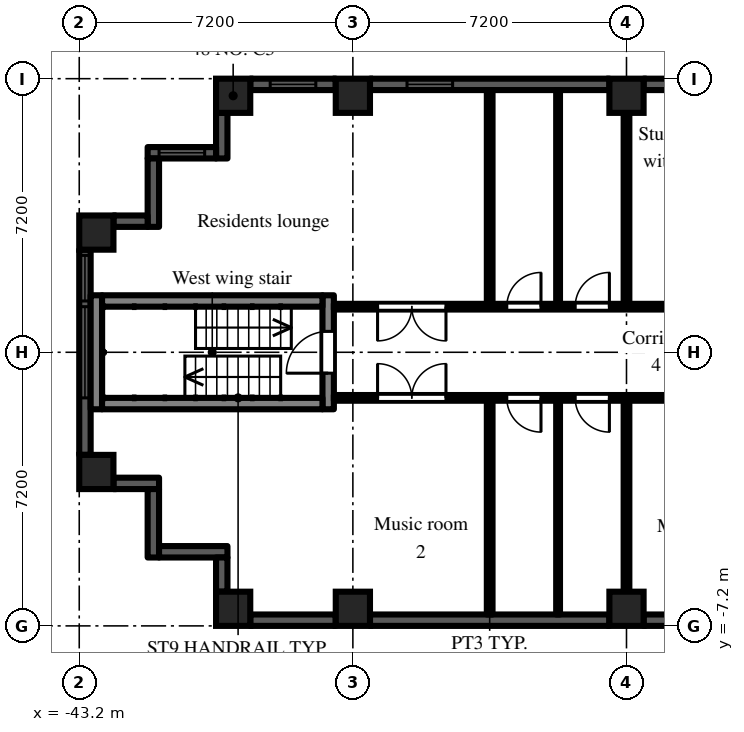
"""IFC4 building model, lengths in metres.
Left out: names, types, materials, properties, quantities, classifications, styles, units other than length and angle.
Written with IfcOpenShell. Run it as: python <this file> out.ifc"""

import sys

from ifc_helpers import new_model, si_unit, direction, frame, frame_2d, origin, origin_2d, place, context, subcontext, project, spatial, rectangle, extrude, element, fill, save


model = new_model("IFC4")
c1 = context("Model", 3, precision=1e-05, world=origin(), true_north=direction((0.0, 1.0)))
c2 = subcontext(c1, "Body", "Model", "MODEL_VIEW")
j1 = project(units=[si_unit("LENGTHUNIT", "METRE"), si_unit("PLANEANGLEUNIT", "RADIAN")], contexts=[c1])
p1 = place(None, origin())
s1 = spatial("IfcSite", under=j1, at=p1, CompositionType="ELEMENT")
p2 = place(p1, origin())
s2 = spatial("IfcBuilding", under=s1, at=p2, CompositionType="ELEMENT")
p3 = place(p2, frame((0.0, 0.0, 108.9)))
s3 = spatial("IfcBuildingStorey", under=s2, at=p3, CompositionType="ELEMENT", Elevation=108.9)
for number, where, z_axis, x_axis in (
    (1, (-42.75, -3.15, 0.0), (0.0, 0.0, 1.0), (1.0, 0.0, 0.0)),
    (2, (-42.75, 3.15, 0.0), (0.0, 0.0, 1.0), (1.0, 0.0, 0.0)),
    (3, (-39.15, -6.75, 0.0), (0.0, 0.0, 1.0), (1.0, 0.0, 0.0)),
    (4, (-39.15, 6.75, 0.0), (0.0, 0.0, 1.0), (1.0, 0.0, 0.0)),
    (5, (-36.0, -6.75, 0.0), (0.0, 0.0, 1.0), (1.0, 0.0, 0.0)),
    (6, (-36.0, 6.75, 0.0), (0.0, 0.0, 1.0), (1.0, 0.0, 0.0)),
    (7, (-28.8, -6.75, 0.0), (0.0, 0.0, 1.0), (1.0, 0.0, 0.0)),
    (8, (-28.8, 6.75, 0.0), (0.0, 0.0, 1.0), (1.0, 0.0, 0.0)),
):
    element("IfcColumn", number, at=place(p3, frame(where, z_axis=z_axis, x_axis=x_axis)), inside=s3, PredefinedType="COLUMN", context=c2, shape_type="SweptSolid", body=[
        extrude(rectangle(XDim=0.9, YDim=0.9, at=origin_2d()), origin(), (0.0, 0.0, 1.0), 3.0),
    ])
p4 = place(p3, frame((-25.2, 7.05, 0.0), z_axis=(0.0, 0.0, 1.0), x_axis=(-1.0, 0.0, 0.0)))
e9 = element("IfcWall", 9, at=p4, inside=s3, PredefinedType="SOLIDWALL", context=c2, shape_type="SweptSolid", body=[
    extrude(rectangle(XDim=3.15, YDim=0.3, at=frame_2d((1.575, 0.0))), origin(), (0.0, 0.0, 1.0), 2.2),
])
p5 = place(p4, frame((0.975, 0.0, 0.2)))
e10 = element("IfcOpeningElement", 10, at=p5, cuts=e9, PredefinedType="OPENING", context=c2, shape_type="SweptSolid", body=[
    extrude(rectangle(XDim=1.2, YDim=1.85, at=frame_2d((0.6, 0.925))), frame((0.0, 0.16, 0.0), z_axis=(0.0, -1.0, 0.0), x_axis=(1.0, 0.0, 0.0)), (0.0, 0.0, 1.0), 0.32),
])
p6 = place(p3, frame((-29.25, 7.05, 0.0), z_axis=(0.0, 0.0, 1.0), x_axis=(-1.0, 0.0, 0.0)))
e11 = element("IfcWall", 11, at=p6, inside=s3, PredefinedType="SOLIDWALL", context=c2, shape_type="SweptSolid", body=[
    extrude(rectangle(XDim=6.3, YDim=0.3, at=frame_2d((3.15, 0.0))), origin(), (0.0, 0.0, 1.0), 2.2),
])
p7 = place(p6, frame((4.125, 0.0, 0.2)))
e12 = element("IfcOpeningElement", 12, at=p7, cuts=e11, PredefinedType="OPENING", context=c2, shape_type="SweptSolid", body=[
    extrude(rectangle(XDim=1.2, YDim=1.85, at=frame_2d((0.6, 0.925))), frame((0.0, 0.16, 0.0), z_axis=(0.0, -1.0, 0.0), x_axis=(1.0, 0.0, 0.0)), (0.0, 0.0, 1.0), 0.32),
])
p8 = place(p3, frame((-36.45, 7.05, 0.0), z_axis=(0.0, 0.0, 1.0), x_axis=(-1.0, 0.0, 0.0)))
e13 = element("IfcWall", 13, at=p8, inside=s3, PredefinedType="SOLIDWALL", context=c2, shape_type="SweptSolid", body=[
    extrude(rectangle(XDim=2.25, YDim=0.3, at=frame_2d((1.125, 0.0))), origin(), (0.0, 0.0, 1.0), 2.2),
])
p9 = place(p8, frame((0.525, 0.0, 0.2)))
e14 = element("IfcOpeningElement", 14, at=p9, cuts=e13, PredefinedType="OPENING", context=c2, shape_type="SweptSolid", body=[
    extrude(rectangle(XDim=1.2, YDim=1.85, at=frame_2d((0.6, 0.925))), frame((0.0, 0.16, 0.0), z_axis=(0.0, -1.0, 0.0), x_axis=(1.0, 0.0, 0.0)), (0.0, 0.0, 1.0), 0.32),
])
p10 = place(p3, frame((-39.45, 6.3, 0.0), z_axis=(0.0, 0.0, 1.0), x_axis=(0.0, -1.0, 0.0)))
e15 = element("IfcWall", 15, at=p10, inside=s3, PredefinedType="SOLIDWALL", context=c2, shape_type="SweptSolid", body=[
    extrude(rectangle(XDim=1.2, YDim=0.3, at=frame_2d((0.6, 0.0))), origin(), (0.0, 0.0, 1.0), 2.55),
])
p11 = place(p3, frame((-39.6, 5.25, 0.0), z_axis=(0.0, 0.0, 1.0), x_axis=(-1.0, 0.0, 0.0)))
e16 = element("IfcWall", 16, at=p11, inside=s3, PredefinedType="SOLIDWALL", context=c2, shape_type="SweptSolid", body=[
    extrude(rectangle(XDim=1.8, YDim=0.3, at=frame_2d((0.9, 0.0))), origin(), (0.0, 0.0, 1.0), 2.55),
])
p12 = place(p11, frame((0.3, 0.0, 0.2)))
e17 = element("IfcOpeningElement", 17, at=p12, cuts=e16, PredefinedType="OPENING", context=c2, shape_type="SweptSolid", body=[
    extrude(rectangle(XDim=1.2, YDim=1.85, at=frame_2d((0.6, 0.925))), frame((0.0, 0.16, 0.0), z_axis=(0.0, -1.0, 0.0), x_axis=(1.0, 0.0, 0.0)), (0.0, 0.0, 1.0), 0.32),
])
p13 = place(p3, frame((-41.25, 5.1, 0.0), z_axis=(0.0, 0.0, 1.0), x_axis=(0.0, -1.0, 0.0)))
e18 = element("IfcWall", 18, at=p13, inside=s3, PredefinedType="SOLIDWALL", context=c2, shape_type="SweptSolid", body=[
    extrude(rectangle(XDim=1.8, YDim=0.3, at=frame_2d((0.9, 0.0))), origin(), (0.0, 0.0, 1.0), 2.55),
])
p14 = place(p3, frame((-41.4, 3.45, 0.0), z_axis=(0.0, 0.0, 1.0), x_axis=(-1.0, 0.0, 0.0)))
e19 = element("IfcWall", 19, at=p14, inside=s3, PredefinedType="SOLIDWALL", context=c2, shape_type="SweptSolid", body=[
    extrude(rectangle(XDim=0.9, YDim=0.3, at=frame_2d((0.45, 0.0))), origin(), (0.0, 0.0, 1.0), 2.55),
])
p15 = place(p3, frame((-43.05, 2.7, 0.0), z_axis=(0.0, 0.0, 1.0), x_axis=(0.0, -1.0, 0.0)))
e20 = element("IfcWall", 20, at=p15, inside=s3, PredefinedType="SOLIDWALL", context=c2, shape_type="SweptSolid", body=[
    extrude(rectangle(XDim=5.4, YDim=0.3, at=frame_2d((2.7, 0.0))), origin(), (0.0, 0.0, 1.0), 2.2),
])
p16 = place(p15, frame((1.5, 0.0, 0.2)))
e21 = element("IfcOpeningElement", 21, at=p16, cuts=e20, PredefinedType="OPENING", context=c2, shape_type="SweptSolid", body=[
    extrude(rectangle(XDim=2.4, YDim=1.85, at=frame_2d((1.2, 0.925))), frame((0.0, 0.16, 0.0), z_axis=(0.0, -1.0, 0.0), x_axis=(1.0, 0.0, 0.0)), (0.0, 0.0, 1.0), 0.32),
])
p17 = place(p15, frame((0.15, 0.0, 0.2)))
e22 = element("IfcOpeningElement", 22, at=p17, cuts=e20, PredefinedType="OPENING", context=c2, shape_type="SweptSolid", body=[
    extrude(rectangle(XDim=1.2, YDim=1.85, at=frame_2d((0.6, 0.925))), frame((0.0, 0.16, 0.0), z_axis=(0.0, -1.0, 0.0), x_axis=(1.0, 0.0, 0.0)), (0.0, 0.0, 1.0), 0.32),
])
p18 = place(p3, frame((-42.3, -3.45, 0.0), z_axis=(0.0, 0.0, 1.0), x_axis=(1.0, 0.0, 0.0)))
e23 = element("IfcWall", 23, at=p18, inside=s3, PredefinedType="SOLIDWALL", context=c2, shape_type="SweptSolid", body=[
    extrude(rectangle(XDim=1.2, YDim=0.3, at=frame_2d((0.6, 0.0))), origin(), (0.0, 0.0, 1.0), 2.55),
])
p19 = place(p3, frame((-41.25, -3.6, 0.0), z_axis=(0.0, 0.0, 1.0), x_axis=(0.0, -1.0, 0.0)))
e24 = element("IfcWall", 24, at=p19, inside=s3, PredefinedType="SOLIDWALL", context=c2, shape_type="SweptSolid", body=[
    extrude(rectangle(XDim=1.8, YDim=0.3, at=frame_2d((0.9, 0.0))), origin(), (0.0, 0.0, 1.0), 2.55),
])
p20 = place(p3, frame((-41.1, -5.25, 0.0), z_axis=(0.0, 0.0, 1.0), x_axis=(1.0, 0.0, 0.0)))
e25 = element("IfcWall", 25, at=p20, inside=s3, PredefinedType="SOLIDWALL", context=c2, shape_type="SweptSolid", body=[
    extrude(rectangle(XDim=1.8, YDim=0.3, at=frame_2d((0.9, 0.0))), origin(), (0.0, 0.0, 1.0), 2.55),
])
p21 = place(p3, frame((-39.45, -5.4, 0.0), z_axis=(0.0, 0.0, 1.0), x_axis=(0.0, -1.0, 0.0)))
e26 = element("IfcWall", 26, at=p21, inside=s3, PredefinedType="SOLIDWALL", context=c2, shape_type="SweptSolid", body=[
    extrude(rectangle(XDim=0.9, YDim=0.3, at=frame_2d((0.45, 0.0))), origin(), (0.0, 0.0, 1.0), 2.55),
])
p22 = place(p3, frame((-38.7, -7.05, 0.0), z_axis=(0.0, 0.0, 1.0), x_axis=(1.0, 0.0, 0.0)))
e27 = element("IfcWall", 27, at=p22, inside=s3, PredefinedType="SOLIDWALL", context=c2, shape_type="SweptSolid", body=[
    extrude(rectangle(XDim=2.25, YDim=0.3, at=frame_2d((1.125, 0.0))), origin(), (0.0, 0.0, 1.0), 2.2),
])
p23 = place(p3, frame((-35.55, -7.05, 0.0), z_axis=(0.0, 0.0, 1.0), x_axis=(1.0, 0.0, 0.0)))
e28 = element("IfcWall", 28, at=p23, inside=s3, PredefinedType="SOLIDWALL", context=c2, shape_type="SweptSolid", body=[
    extrude(rectangle(XDim=6.3, YDim=0.3, at=frame_2d((3.15, 0.0))), origin(), (0.0, 0.0, 1.0), 2.2),
])
p24 = place(p3, frame((-28.35, -7.05, 0.0), z_axis=(0.0, 0.0, 1.0), x_axis=(1.0, 0.0, 0.0)))
e29 = element("IfcWall", 29, at=p24, inside=s3, PredefinedType="SOLIDWALL", context=c2, shape_type="SweptSolid", body=[
    extrude(rectangle(XDim=3.15, YDim=0.3, at=frame_2d((1.575, 0.0))), origin(), (0.0, 0.0, 1.0), 2.2),
])
p25 = place(p3, frame((-36.65, -1.5, 0.0), z_axis=(0.0, 0.0, 1.0), x_axis=(0.0, 1.0, 0.0)))
e30 = element("IfcWall", 30, at=p25, inside=s3, PredefinedType="SHEAR", context=c2, shape_type="SweptSolid", body=[
    extrude(rectangle(XDim=3.0, YDim=0.3, at=frame_2d((1.5, 0.0))), origin(), (0.0, 0.0, 1.0), 2.55),
])
p26 = place(p25, frame((0.95, 0.0, 0.0)))
e31 = element("IfcOpeningElement", 31, at=p26, cuts=e30, PredefinedType="OPENING", context=c2, shape_type="SweptSolid", body=[
    extrude(rectangle(XDim=1.1, YDim=2.1, at=frame_2d((0.55, 1.05))), frame((0.0, 0.16, 0.0), z_axis=(0.0, -1.0, 0.0), x_axis=(1.0, 0.0, 0.0)), (0.0, 0.0, 1.0), 0.32),
])
p27 = place(p3, frame((-42.75, -1.5, 0.0), z_axis=(0.0, 0.0, 1.0), x_axis=(0.0, 1.0, 0.0)))
e32 = element("IfcWall", 32, at=p27, inside=s3, PredefinedType="SHEAR", context=c2, shape_type="SweptSolid", body=[
    extrude(rectangle(XDim=3.0, YDim=0.3, at=frame_2d((1.5, 0.0))), origin(), (0.0, 0.0, 1.0), 2.55),
])
for number, where, z_axis, x_axis in (
    (33, (-36.8, -1.35, 0.0), (0.0, 0.0, 1.0), (-1.0, 0.0, 0.0)),
    (34, (-36.8, 1.35, 0.0), (0.0, 0.0, 1.0), (-1.0, 0.0, 0.0)),
):
    element("IfcWall", number, at=place(p3, frame(where, z_axis=z_axis, x_axis=x_axis)), inside=s3, PredefinedType="SHEAR", context=c2, shape_type="SweptSolid", body=[
        extrude(rectangle(XDim=5.8, YDim=0.3, at=frame_2d((2.9, 0.0))), origin(), (0.0, 0.0, 1.0), 2.55),
    ])
p28 = place(p3, frame((-36.5, -1.2, 0.0), z_axis=(0.0, 0.0, 1.0), x_axis=(1.0, 0.0, 0.0)))
e35 = element("IfcWall", 35, at=p28, inside=s3, PredefinedType="PARTITIONING", context=c2, shape_type="SweptSolid", body=[
    extrude(rectangle(XDim=14.9, YDim=0.15, at=frame_2d((7.45, 0.0))), origin(), (0.0, 0.0, 1.0), 2.55),
])
p29 = place(p28, frame((10.4, 0.0, 0.0)))
e36 = element("IfcOpeningElement", 36, at=p29, cuts=e35, PredefinedType="OPENING", context=c2, shape_type="SweptSolid", body=[
    extrude(rectangle(XDim=1.8, YDim=2.1, at=frame_2d((0.9, 1.05))), frame((0.0, 0.085, 0.0), z_axis=(0.0, -1.0, 0.0), x_axis=(1.0, 0.0, 0.0)), (0.0, 0.0, 1.0), 0.17),
])
p30 = place(p28, frame((6.35, 0.0, 0.0)))
e37 = element("IfcOpeningElement", 37, at=p30, cuts=e35, PredefinedType="OPENING", context=c2, shape_type="SweptSolid", body=[
    extrude(rectangle(XDim=0.9, YDim=2.1, at=frame_2d((0.45, 1.05))), frame((0.0, 0.085, 0.0), z_axis=(0.0, -1.0, 0.0), x_axis=(1.0, 0.0, 0.0)), (0.0, 0.0, 1.0), 0.17),
])
p31 = place(p28, frame((4.55, 0.0, 0.0)))
e38 = element("IfcOpeningElement", 38, at=p31, cuts=e35, PredefinedType="OPENING", context=c2, shape_type="SweptSolid", body=[
    extrude(rectangle(XDim=0.9, YDim=2.1, at=frame_2d((0.45, 1.05))), frame((0.0, 0.085, 0.0), z_axis=(0.0, -1.0, 0.0), x_axis=(1.0, 0.0, 0.0)), (0.0, 0.0, 1.0), 0.17),
])
p32 = place(p28, frame((1.15, 0.0, 0.0)))
e39 = element("IfcOpeningElement", 39, at=p32, cuts=e35, PredefinedType="OPENING", context=c2, shape_type="SweptSolid", body=[
    extrude(rectangle(XDim=1.8, YDim=2.1, at=frame_2d((0.9, 1.05))), frame((0.0, 0.085, 0.0), z_axis=(0.0, -1.0, 0.0), x_axis=(1.0, 0.0, 0.0)), (0.0, 0.0, 1.0), 0.17),
])
p33 = place(p3, frame((-36.5, 1.2, 0.0), z_axis=(0.0, 0.0, 1.0), x_axis=(1.0, 0.0, 0.0)))
e40 = element("IfcWall", 40, at=p33, inside=s3, PredefinedType="PARTITIONING", context=c2, shape_type="SweptSolid", body=[
    extrude(rectangle(XDim=14.9, YDim=0.15, at=frame_2d((7.45, 0.0))), origin(), (0.0, 0.0, 1.0), 2.55),
])
p34 = place(p33, frame((10.1, 0.0, 0.0)))
e41 = element("IfcOpeningElement", 41, at=p34, cuts=e40, PredefinedType="OPENING", context=c2, shape_type="SweptSolid", body=[
    extrude(rectangle(XDim=1.0, YDim=2.1, at=frame_2d((0.5, 1.05))), frame((0.0, 0.085, 0.0), z_axis=(0.0, -1.0, 0.0), x_axis=(1.0, 0.0, 0.0)), (0.0, 0.0, 1.0), 0.17),
])
p35 = place(p33, frame((6.35, 0.0, 0.0)))
e42 = element("IfcOpeningElement", 42, at=p35, cuts=e40, PredefinedType="OPENING", context=c2, shape_type="SweptSolid", body=[
    extrude(rectangle(XDim=0.9, YDim=2.1, at=frame_2d((0.45, 1.05))), frame((0.0, 0.085, 0.0), z_axis=(0.0, -1.0, 0.0), x_axis=(1.0, 0.0, 0.0)), (0.0, 0.0, 1.0), 0.17),
])
p36 = place(p33, frame((4.55, 0.0, 0.0)))
e43 = element("IfcOpeningElement", 43, at=p36, cuts=e40, PredefinedType="OPENING", context=c2, shape_type="SweptSolid", body=[
    extrude(rectangle(XDim=0.9, YDim=2.1, at=frame_2d((0.45, 1.05))), frame((0.0, 0.085, 0.0), z_axis=(0.0, -1.0, 0.0), x_axis=(1.0, 0.0, 0.0)), (0.0, 0.0, 1.0), 0.17),
])
p37 = place(p33, frame((1.15, 0.0, 0.0)))
e44 = element("IfcOpeningElement", 44, at=p37, cuts=e40, PredefinedType="OPENING", context=c2, shape_type="SweptSolid", body=[
    extrude(rectangle(XDim=1.8, YDim=2.1, at=frame_2d((0.9, 1.05))), frame((0.0, 0.085, 0.0), z_axis=(0.0, -1.0, 0.0), x_axis=(1.0, 0.0, 0.0)), (0.0, 0.0, 1.0), 0.17),
])
for number, where, z_axis, x_axis in (
    (45, (-32.4, -6.9, 0.0), (0.0, 0.0, 1.0), (0.0, 1.0, 0.0)),
    (46, (-32.4, 1.275, 0.0), (0.0, 0.0, 1.0), (0.0, 1.0, 0.0)),
):
    element("IfcWall", number, at=place(p3, frame(where, z_axis=z_axis, x_axis=x_axis)), inside=s3, PredefinedType="PARTITIONING", context=c2, shape_type="SweptSolid", body=[
        extrude(rectangle(XDim=5.625, YDim=0.15, at=frame_2d((2.812, 0.0))), origin(), (0.0, 0.0, 1.0), 2.55),
    ])
for number, where, z_axis, x_axis in (
    (47, (-30.6, -6.9, 0.0), (0.0, 0.0, 1.0), (0.0, 1.0, 0.0)),
    (48, (-30.6, 1.275, 0.0), (0.0, 0.0, 1.0), (0.0, 1.0, 0.0)),
):
    element("IfcWall", number, at=place(p3, frame(where, z_axis=z_axis, x_axis=x_axis)), inside=s3, PredefinedType="PARTITIONING", context=c2, shape_type="SweptSolid", body=[
        extrude(rectangle(XDim=5.625, YDim=0.1, at=frame_2d((2.812, 0.0))), origin(), (0.0, 0.0, 1.0), 2.55),
    ])
for number, where, z_axis, x_axis in (
    (49, (-28.8, -6.9, 0.0), (0.0, 0.0, 1.0), (0.0, 1.0, 0.0)),
    (50, (-28.8, 1.275, 0.0), (0.0, 0.0, 1.0), (0.0, 1.0, 0.0)),
):
    element("IfcWall", number, at=place(p3, frame(where, z_axis=z_axis, x_axis=x_axis)), inside=s3, PredefinedType="PARTITIONING", context=c2, shape_type="SweptSolid", body=[
        extrude(rectangle(XDim=5.625, YDim=0.15, at=frame_2d((2.812, 0.0))), origin(), (0.0, 0.0, 1.0), 2.55),
    ])
p38 = place(p7, origin())
e51 = element("IfcWindow", 51, at=p38, inside=s3, PartitioningType="SINGLE_PANEL", PredefinedType="WINDOW", context=c2, shape_type="SweptSolid", body=[
    extrude(rectangle(XDim=1.2, YDim=1.85, at=frame_2d((0.6, 0.925))), frame((0.0, 0.03, 0.0), z_axis=(0.0, -1.0, 0.0), x_axis=(1.0, 0.0, 0.0)), (0.0, 0.0, 1.0), 0.06),
])
fill(e12, e51)
p39 = place(p9, origin())
e52 = element("IfcWindow", 52, at=p39, inside=s3, PartitioningType="SINGLE_PANEL", PredefinedType="WINDOW", context=c2, shape_type="SweptSolid", body=[
    extrude(rectangle(XDim=1.2, YDim=1.85, at=frame_2d((0.6, 0.925))), frame((0.0, 0.03, 0.0), z_axis=(0.0, -1.0, 0.0), x_axis=(1.0, 0.0, 0.0)), (0.0, 0.0, 1.0), 0.06),
])
fill(e14, e52)
p40 = place(p12, origin())
e53 = element("IfcWindow", 53, at=p40, inside=s3, PartitioningType="SINGLE_PANEL", PredefinedType="WINDOW", context=c2, shape_type="SweptSolid", body=[
    extrude(rectangle(XDim=1.2, YDim=1.85, at=frame_2d((0.6, 0.925))), frame((0.0, 0.03, 0.0), z_axis=(0.0, -1.0, 0.0), x_axis=(1.0, 0.0, 0.0)), (0.0, 0.0, 1.0), 0.06),
])
fill(e17, e53)
p41 = place(p16, origin())
e54 = element("IfcWindow", 54, at=p41, inside=s3, PartitioningType="SINGLE_PANEL", PredefinedType="WINDOW", context=c2, shape_type="SweptSolid", body=[
    extrude(rectangle(XDim=2.4, YDim=1.85, at=frame_2d((1.2, 0.925))), frame((0.0, 0.03, 0.0), z_axis=(0.0, -1.0, 0.0), x_axis=(1.0, 0.0, 0.0)), (0.0, 0.0, 1.0), 0.06),
])
fill(e21, e54)
p42 = place(p17, origin())
e55 = element("IfcWindow", 55, at=p42, inside=s3, PartitioningType="SINGLE_PANEL", PredefinedType="WINDOW", context=c2, shape_type="SweptSolid", body=[
    extrude(rectangle(XDim=1.2, YDim=1.85, at=frame_2d((0.6, 0.925))), frame((0.0, 0.03, 0.0), z_axis=(0.0, -1.0, 0.0), x_axis=(1.0, 0.0, 0.0)), (0.0, 0.0, 1.0), 0.06),
])
fill(e22, e55)
p43 = place(p26, origin())
e56 = element("IfcDoor", 56, at=p43, inside=s3, OperationType="SINGLE_SWING_LEFT", PredefinedType="DOOR", context=c2, shape_type="SweptSolid", body=[
    extrude(rectangle(XDim=1.1, YDim=2.1, at=frame_2d((0.55, 1.05))), frame((0.0, 0.025, 0.0), z_axis=(0.0, -1.0, 0.0), x_axis=(1.0, 0.0, 0.0)), (0.0, 0.0, 1.0), 0.05),
])
fill(e31, e56)
p44 = place(p30, frame((0.9, 0.0, 0.0), z_axis=(0.0, 0.0, 1.0), x_axis=(-1.0, 0.0, 0.0)))
e57 = element("IfcDoor", 57, at=p44, inside=s3, OperationType="SINGLE_SWING_LEFT", PredefinedType="DOOR", context=c2, shape_type="SweptSolid", body=[
    extrude(rectangle(XDim=0.9, YDim=2.1, at=frame_2d((0.45, 1.05))), frame((0.0, 0.025, 0.0), z_axis=(0.0, -1.0, 0.0), x_axis=(1.0, 0.0, 0.0)), (0.0, 0.0, 1.0), 0.05),
])
fill(e37, e57)
p45 = place(p31, frame((0.9, 0.0, 0.0), z_axis=(0.0, 0.0, 1.0), x_axis=(-1.0, 0.0, 0.0)))
e58 = element("IfcDoor", 58, at=p45, inside=s3, OperationType="SINGLE_SWING_LEFT", PredefinedType="DOOR", context=c2, shape_type="SweptSolid", body=[
    extrude(rectangle(XDim=0.9, YDim=2.1, at=frame_2d((0.45, 1.05))), frame((0.0, 0.025, 0.0), z_axis=(0.0, -1.0, 0.0), x_axis=(1.0, 0.0, 0.0)), (0.0, 0.0, 1.0), 0.05),
])
fill(e38, e58)
p46 = place(p32, origin())
e59 = element("IfcDoor", 59, at=p46, inside=s3, OperationType="DOUBLE_DOOR_DOUBLE_SWING", PredefinedType="DOOR", context=c2, shape_type="SweptSolid", body=[
    extrude(rectangle(XDim=1.8, YDim=2.1, at=frame_2d((0.9, 1.05))), frame((0.0, 0.025, 0.0), z_axis=(0.0, -1.0, 0.0), x_axis=(1.0, 0.0, 0.0)), (0.0, 0.0, 1.0), 0.05),
])
fill(e39, e59)
p47 = place(p35, origin())
e60 = element("IfcDoor", 60, at=p47, inside=s3, OperationType="SINGLE_SWING_RIGHT", PredefinedType="DOOR", context=c2, shape_type="SweptSolid", body=[
    extrude(rectangle(XDim=0.9, YDim=2.1, at=frame_2d((0.45, 1.05))), frame((0.0, 0.025, 0.0), z_axis=(0.0, -1.0, 0.0), x_axis=(1.0, 0.0, 0.0)), (0.0, 0.0, 1.0), 0.05),
])
fill(e42, e60)
p48 = place(p36, origin())
e61 = element("IfcDoor", 61, at=p48, inside=s3, OperationType="SINGLE_SWING_RIGHT", PredefinedType="DOOR", context=c2, shape_type="SweptSolid", body=[
    extrude(rectangle(XDim=0.9, YDim=2.1, at=frame_2d((0.45, 1.05))), frame((0.0, 0.025, 0.0), z_axis=(0.0, -1.0, 0.0), x_axis=(1.0, 0.0, 0.0)), (0.0, 0.0, 1.0), 0.05),
])
fill(e43, e61)
p49 = place(p37, frame((1.8, 0.0, 0.0), z_axis=(0.0, 0.0, 1.0), x_axis=(-1.0, 0.0, 0.0)))
e62 = element("IfcDoor", 62, at=p49, inside=s3, OperationType="DOUBLE_DOOR_DOUBLE_SWING", PredefinedType="DOOR", context=c2, shape_type="SweptSolid", body=[
    extrude(rectangle(XDim=1.8, YDim=2.1, at=frame_2d((0.9, 1.05))), frame((0.0, 0.025, 0.0), z_axis=(0.0, -1.0, 0.0), x_axis=(1.0, 0.0, 0.0)), (0.0, 0.0, 1.0), 0.05),
])
fill(e44, e62)
save(model, sys.argv[1])
